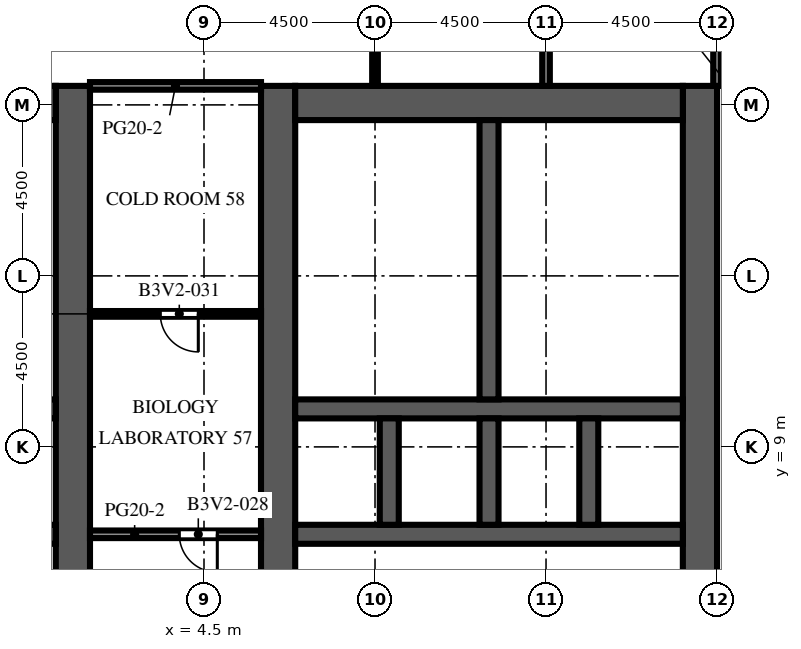
"""IFC4 building model, lengths in metres.
Left out: names, types, materials, properties, quantities, classifications, styles, units other than length and angle.
Written with IfcOpenShell. Run it as: python <this file> out.ifc"""

import sys

from ifc_helpers import new_model, si_unit, direction, frame, frame_2d, origin, place, context, subcontext, project, spatial, rectangle, extrude, element, fill, save


model = new_model("IFC4")
c1 = context("Model", 3, precision=1e-05, world=origin(), true_north=direction((0.0, 1.0)))
c2 = subcontext(c1, "Body", "Model", "MODEL_VIEW")
j1 = project(units=[si_unit("LENGTHUNIT", "METRE"), si_unit("PLANEANGLEUNIT", "RADIAN")], contexts=[c1])
p1 = place(None, origin())
s1 = spatial("IfcSite", under=j1, at=p1, CompositionType="ELEMENT")
p2 = place(p1, origin())
s2 = spatial("IfcBuilding", under=s1, at=p2, CompositionType="ELEMENT")
p3 = place(p2, frame((0.0, 0.0, 106.6)))
s3 = spatial("IfcBuildingStorey", under=s2, at=p3, CompositionType="ELEMENT", Elevation=106.6)
p4 = place(p3, frame((1.05, -9.0, 0.0), z_axis=(0.0, 0.0, 1.0), x_axis=(0.0, 1.0, 0.0)))
e1 = element("IfcWall", 1, at=p4, inside=s3, PredefinedType="SHEAR", context=c2, shape_type="SweptSolid", body=[
    extrude(rectangle(XDim=27.5, YDim=0.9, at=frame_2d((13.75, 0.0))), origin(), (0.0, 0.0, 1.0), 4.1),
])
p5 = place(p4, frame((12.55, 0.0, 0.0)))
e2 = element("IfcOpeningElement", 2, at=p5, cuts=e1, PredefinedType="OPENING", context=c2, shape_type="SweptSolid", body=[
    extrude(rectangle(XDim=2.4, YDim=2.4, at=frame_2d((1.2, 1.2))), frame((0.0, 0.46, 0.0), z_axis=(0.0, -1.0, 0.0), x_axis=(1.0, 0.0, 0.0)), (0.0, 0.0, 1.0), 0.92),
])
p6 = place(p4, frame((3.893, 0.0, 0.0)))
e3 = element("IfcOpeningElement", 3, at=p6, cuts=e1, PredefinedType="OPENING", context=c2, shape_type="SweptSolid", body=[
    extrude(rectangle(XDim=0.923, YDim=2.1, at=frame_2d((0.461, 1.05))), frame((0.0, 0.46, 0.0), z_axis=(0.0, -1.0, 0.0), x_axis=(1.0, 0.0, 0.0)), (0.0, 0.0, 1.0), 0.92),
])
p7 = place(p4, frame((23.427, 0.0, 0.0)))
e4 = element("IfcOpeningElement", 4, at=p7, cuts=e1, PredefinedType="OPENING", context=c2, shape_type="SweptSolid", body=[
    extrude(rectangle(XDim=1.2, YDim=2.1, at=frame_2d((0.6, 1.05))), frame((0.0, 0.46, 0.0), z_axis=(0.0, -1.0, 0.0), x_axis=(1.0, 0.0, 0.0)), (0.0, 0.0, 1.0), 0.92),
])
p8 = place(p3, frame((-9.6, 18.05, 0.0), z_axis=(0.0, 0.0, 1.0), x_axis=(1.0, 0.0, 0.0)))
e5 = element("IfcWall", 5, at=p8, inside=s3, PredefinedType="SHEAR", context=c2, shape_type="SweptSolid", body=[
    extrude(rectangle(XDim=10.2, YDim=0.9, at=frame_2d((5.1, 0.0))), origin(), (0.0, 0.0, 1.0), 4.1),
])
p9 = place(p3, frame((-9.6, 6.7, 0.0), z_axis=(0.0, 0.0, 1.0), x_axis=(1.0, 0.0, 0.0)))
e6 = element("IfcWall", 6, at=p9, inside=s3, PredefinedType="SHEAR", context=c2, shape_type="SweptSolid", body=[
    extrude(rectangle(XDim=10.2, YDim=0.5, at=frame_2d((5.1, 0.0))), origin(), (0.0, 0.0, 1.0), 4.1),
])
p10 = place(p9, frame((0.562, 0.0, 0.0)))
e7 = element("IfcOpeningElement", 7, at=p10, cuts=e6, PredefinedType="OPENING", context=c2, shape_type="SweptSolid", body=[
    extrude(rectangle(XDim=1.1, YDim=2.1, at=frame_2d((0.55, 1.05))), frame((0.0, 0.26, 0.0), z_axis=(0.0, -1.0, 0.0), x_axis=(1.0, 0.0, 0.0)), (0.0, 0.0, 1.0), 0.52),
])
p11 = place(p9, frame((3.288, 0.0, 0.0)))
e8 = element("IfcOpeningElement", 8, at=p11, cuts=e6, PredefinedType="OPENING", context=c2, shape_type="SweptSolid", body=[
    extrude(rectangle(XDim=1.0, YDim=2.1, at=frame_2d((0.5, 1.05))), frame((0.0, 0.26, 0.0), z_axis=(0.0, -1.0, 0.0), x_axis=(1.0, 0.0, 0.0)), (0.0, 0.0, 1.0), 0.52),
])
p12 = place(p9, frame((5.913, 0.0, 0.0)))
e9 = element("IfcOpeningElement", 9, at=p12, cuts=e6, PredefinedType="OPENING", context=c2, shape_type="SweptSolid", body=[
    extrude(rectangle(XDim=1.0, YDim=2.1, at=frame_2d((0.5, 1.05))), frame((0.0, 0.26, 0.0), z_axis=(0.0, -1.0, 0.0), x_axis=(1.0, 0.0, 0.0)), (0.0, 0.0, 1.0), 0.52),
])
p13 = place(p9, frame((8.587, 0.0, 0.0)))
e10 = element("IfcOpeningElement", 10, at=p13, cuts=e6, PredefinedType="OPENING", context=c2, shape_type="SweptSolid", body=[
    extrude(rectangle(XDim=1.0, YDim=2.1, at=frame_2d((0.5, 1.05))), frame((0.0, 0.26, 0.0), z_axis=(0.0, -1.0, 0.0), x_axis=(1.0, 0.0, 0.0)), (0.0, 0.0, 1.0), 0.52),
])
p14 = place(p3, frame((-9.6, 10.0, 0.0), z_axis=(0.0, 0.0, 1.0), x_axis=(1.0, 0.0, 0.0)))
e11 = element("IfcWall", 11, at=p14, inside=s3, PredefinedType="SHEAR", context=c2, shape_type="SweptSolid", body=[
    extrude(rectangle(XDim=10.2, YDim=0.5, at=frame_2d((5.1, 0.0))), origin(), (0.0, 0.0, 1.0), 4.1),
])
p15 = place(p3, frame((6.45, -9.0, 0.0), z_axis=(0.0, 0.0, 1.0), x_axis=(0.0, 1.0, 0.0)))
e12 = element("IfcWall", 12, at=p15, inside=s3, PredefinedType="SHEAR", context=c2, shape_type="SweptSolid", body=[
    extrude(rectangle(XDim=27.5, YDim=0.9, at=frame_2d((13.75, 0.0))), origin(), (0.0, 0.0, 1.0), 4.1),
])
p16 = place(p15, frame((12.55, 0.0, 0.0)))
e13 = element("IfcOpeningElement", 13, at=p16, cuts=e12, PredefinedType="OPENING", context=c2, shape_type="SweptSolid", body=[
    extrude(rectangle(XDim=2.4, YDim=2.4, at=frame_2d((1.2, 1.2))), frame((0.0, 0.46, 0.0), z_axis=(0.0, -1.0, 0.0), x_axis=(1.0, 0.0, 0.0)), (0.0, 0.0, 1.0), 0.92),
])
p17 = place(p15, frame((3.893, 0.0, 0.0)))
e14 = element("IfcOpeningElement", 14, at=p17, cuts=e12, PredefinedType="OPENING", context=c2, shape_type="SweptSolid", body=[
    extrude(rectangle(XDim=0.923, YDim=2.1, at=frame_2d((0.461, 1.05))), frame((0.0, 0.46, 0.0), z_axis=(0.0, -1.0, 0.0), x_axis=(1.0, 0.0, 0.0)), (0.0, 0.0, 1.0), 0.92),
])
p18 = place(p15, frame((23.427, 0.0, 0.0)))
e15 = element("IfcOpeningElement", 15, at=p18, cuts=e12, PredefinedType="OPENING", context=c2, shape_type="SweptSolid", body=[
    extrude(rectangle(XDim=1.2, YDim=2.1, at=frame_2d((0.6, 1.05))), frame((0.0, 0.46, 0.0), z_axis=(0.0, -1.0, 0.0), x_axis=(1.0, 0.0, 0.0)), (0.0, 0.0, 1.0), 0.92),
])
p19 = place(p3, frame((17.55, -9.0, 0.0), z_axis=(0.0, 0.0, 1.0), x_axis=(0.0, 1.0, 0.0)))
e16 = element("IfcWall", 16, at=p19, inside=s3, PredefinedType="SHEAR", context=c2, shape_type="SweptSolid", body=[
    extrude(rectangle(XDim=27.5, YDim=0.9, at=frame_2d((13.75, 0.0))), origin(), (0.0, 0.0, 1.0), 4.1),
])
p20 = place(p19, frame((12.55, 0.0, 0.0)))
e17 = element("IfcOpeningElement", 17, at=p20, cuts=e16, PredefinedType="OPENING", context=c2, shape_type="SweptSolid", body=[
    extrude(rectangle(XDim=2.4, YDim=2.4, at=frame_2d((1.2, 1.2))), frame((0.0, 0.46, 0.0), z_axis=(0.0, -1.0, 0.0), x_axis=(1.0, 0.0, 0.0)), (0.0, 0.0, 1.0), 0.92),
])
p21 = place(p19, frame((6.825, 0.0, 0.0)))
e18 = element("IfcOpeningElement", 18, at=p21, cuts=e16, PredefinedType="OPENING", context=c2, shape_type="SweptSolid", body=[
    extrude(rectangle(XDim=1.2, YDim=2.1, at=frame_2d((0.6, 1.05))), frame((0.0, 0.46, 0.0), z_axis=(0.0, -1.0, 0.0), x_axis=(1.0, 0.0, 0.0)), (0.0, 0.0, 1.0), 0.92),
])
p22 = place(p19, frame((19.475, 0.0, 0.0)))
e19 = element("IfcOpeningElement", 19, at=p22, cuts=e16, PredefinedType="OPENING", context=c2, shape_type="SweptSolid", body=[
    extrude(rectangle(XDim=1.2, YDim=2.1, at=frame_2d((0.6, 1.05))), frame((0.0, 0.46, 0.0), z_axis=(0.0, -1.0, 0.0), x_axis=(1.0, 0.0, 0.0)), (0.0, 0.0, 1.0), 0.92),
])
p23 = place(p3, frame((6.9, 18.05, 0.0), z_axis=(0.0, 0.0, 1.0), x_axis=(1.0, 0.0, 0.0)))
e20 = element("IfcWall", 20, at=p23, inside=s3, PredefinedType="SHEAR", context=c2, shape_type="SweptSolid", body=[
    extrude(rectangle(XDim=10.2, YDim=0.9, at=frame_2d((5.1, 0.0))), origin(), (0.0, 0.0, 1.0), 4.1),
])
p24 = place(p3, frame((6.9, 6.7, 0.0), z_axis=(0.0, 0.0, 1.0), x_axis=(1.0, 0.0, 0.0)))
e21 = element("IfcWall", 21, at=p24, inside=s3, PredefinedType="SHEAR", context=c2, shape_type="SweptSolid", body=[
    extrude(rectangle(XDim=10.2, YDim=0.5, at=frame_2d((5.1, 0.0))), origin(), (0.0, 0.0, 1.0), 4.1),
])
p25 = place(p24, frame((0.562, 0.0, 0.0)))
e22 = element("IfcOpeningElement", 22, at=p25, cuts=e21, PredefinedType="OPENING", context=c2, shape_type="SweptSolid", body=[
    extrude(rectangle(XDim=1.1, YDim=2.1, at=frame_2d((0.55, 1.05))), frame((0.0, 0.26, 0.0), z_axis=(0.0, -1.0, 0.0), x_axis=(1.0, 0.0, 0.0)), (0.0, 0.0, 1.0), 0.52),
])
p26 = place(p24, frame((3.288, 0.0, 0.0)))
e23 = element("IfcOpeningElement", 23, at=p26, cuts=e21, PredefinedType="OPENING", context=c2, shape_type="SweptSolid", body=[
    extrude(rectangle(XDim=1.0, YDim=2.1, at=frame_2d((0.5, 1.05))), frame((0.0, 0.26, 0.0), z_axis=(0.0, -1.0, 0.0), x_axis=(1.0, 0.0, 0.0)), (0.0, 0.0, 1.0), 0.52),
])
p27 = place(p24, frame((5.913, 0.0, 0.0)))
e24 = element("IfcOpeningElement", 24, at=p27, cuts=e21, PredefinedType="OPENING", context=c2, shape_type="SweptSolid", body=[
    extrude(rectangle(XDim=1.0, YDim=2.1, at=frame_2d((0.5, 1.05))), frame((0.0, 0.26, 0.0), z_axis=(0.0, -1.0, 0.0), x_axis=(1.0, 0.0, 0.0)), (0.0, 0.0, 1.0), 0.52),
])
p28 = place(p24, frame((8.587, 0.0, 0.0)))
e25 = element("IfcOpeningElement", 25, at=p28, cuts=e21, PredefinedType="OPENING", context=c2, shape_type="SweptSolid", body=[
    extrude(rectangle(XDim=1.0, YDim=2.1, at=frame_2d((0.5, 1.05))), frame((0.0, 0.26, 0.0), z_axis=(0.0, -1.0, 0.0), x_axis=(1.0, 0.0, 0.0)), (0.0, 0.0, 1.0), 0.52),
])
p29 = place(p3, frame((6.9, 10.0, 0.0), z_axis=(0.0, 0.0, 1.0), x_axis=(1.0, 0.0, 0.0)))
e26 = element("IfcWall", 26, at=p29, inside=s3, PredefinedType="SHEAR", context=c2, shape_type="SweptSolid", body=[
    extrude(rectangle(XDim=10.2, YDim=0.5, at=frame_2d((5.1, 0.0))), origin(), (0.0, 0.0, 1.0), 4.1),
])
for number, where, z_axis, x_axis in (
    (27, (9.375, 6.95, 0.0), (0.0, 0.0, 1.0), (0.0, 1.0, 0.0)),
    (28, (12.0, 6.95, 0.0), (0.0, 0.0, 1.0), (0.0, 1.0, 0.0)),
    (29, (14.625, 6.95, 0.0), (0.0, 0.0, 1.0), (0.0, 1.0, 0.0)),
):
    element("IfcWall", number, at=place(p3, frame(where, z_axis=z_axis, x_axis=x_axis)), inside=s3, PredefinedType="SHEAR", context=c2, shape_type="SweptSolid", body=[
        extrude(rectangle(XDim=2.8, YDim=0.5, at=frame_2d((1.4, 0.0))), origin(), (0.0, 0.0, 1.0), 4.1),
    ])
p30 = place(p3, frame((12.0, 10.25, 0.0), z_axis=(0.0, 0.0, 1.0), x_axis=(0.0, 1.0, 0.0)))
e30 = element("IfcWall", 30, at=p30, inside=s3, PredefinedType="SHEAR", context=c2, shape_type="SweptSolid", body=[
    extrude(rectangle(XDim=7.35, YDim=0.5, at=frame_2d((3.675, 0.0))), origin(), (0.0, 0.0, 1.0), 4.1),
])
p31 = place(p3, frame((-0.7, 12.455, 0.0), z_axis=(0.0, 0.0, 1.0), x_axis=(1.0, 0.0, 0.0)))
e31 = element("IfcWall", 31, at=p31, inside=s3, PredefinedType="PARTITIONING", context=c2, shape_type="SweptSolid", body=[
    extrude(rectangle(XDim=1.3, YDim=0.1, at=frame_2d((0.65, 0.0))), origin(), (0.0, 0.0, 1.0), 3.5),
])
p32 = place(p31, frame((0.2, 0.0, 0.0)))
e32 = element("IfcOpeningElement", 32, at=p32, cuts=e31, PredefinedType="OPENING", context=c2, shape_type="SweptSolid", body=[
    extrude(rectangle(XDim=0.9, YDim=2.1, at=frame_2d((0.45, 1.05))), frame((0.0, 0.06, 0.0), z_axis=(0.0, -1.0, 0.0), x_axis=(1.0, 0.0, 0.0)), (0.0, 0.0, 1.0), 0.12),
])
p33 = place(p3, frame((6.9, 12.455, 0.0), z_axis=(0.0, 0.0, 1.0), x_axis=(1.0, 0.0, 0.0)))
e33 = element("IfcWall", 33, at=p33, inside=s3, PredefinedType="PARTITIONING", context=c2, shape_type="SweptSolid", body=[
    extrude(rectangle(XDim=1.3, YDim=0.1, at=frame_2d((0.65, 0.0))), origin(), (0.0, 0.0, 1.0), 3.5),
])
p34 = place(p33, frame((0.2, 0.0, 0.0)))
e34 = element("IfcOpeningElement", 34, at=p34, cuts=e33, PredefinedType="OPENING", context=c2, shape_type="SweptSolid", body=[
    extrude(rectangle(XDim=0.9, YDim=2.1, at=frame_2d((0.45, 1.05))), frame((0.0, 0.06, 0.0), z_axis=(0.0, -1.0, 0.0), x_axis=(1.0, 0.0, 0.0)), (0.0, 0.0, 1.0), 0.12),
])
p35 = place(p3, frame((8.2, 12.455, 0.0), z_axis=(0.0, 0.0, 1.0), x_axis=(1.0, 0.0, 0.0)))
e35 = element("IfcWall", 35, at=p35, inside=s3, PredefinedType="PARTITIONING", context=c2, shape_type="SweptSolid", body=[
    extrude(rectangle(XDim=3.55, YDim=0.1, at=frame_2d((1.775, 0.0))), origin(), (0.0, 0.0, 1.0), 3.5),
])
p36 = place(p3, frame((8.2, 12.455, 0.0), z_axis=(0.0, 0.0, 1.0), x_axis=(0.0, 1.0, 0.0)))
e36 = element("IfcWall", 36, at=p36, inside=s3, PredefinedType="PARTITIONING", context=c2, shape_type="SweptSolid", body=[
    extrude(rectangle(XDim=2.573, YDim=0.1, at=frame_2d((1.286, 0.0))), origin(), (0.0, 0.0, 1.0), 3.5),
])
p37 = place(p36, frame((0.786, 0.0, 0.0)))
e37 = element("IfcOpeningElement", 37, at=p37, cuts=e36, PredefinedType="OPENING", context=c2, shape_type="SweptSolid", body=[
    extrude(rectangle(XDim=1.0, YDim=2.1, at=frame_2d((0.5, 1.05))), frame((0.0, 0.06, 0.0), z_axis=(0.0, -1.0, 0.0), x_axis=(1.0, 0.0, 0.0)), (0.0, 0.0, 1.0), 0.12),
])
p38 = place(p3, frame((8.2, 15.028, 0.0), z_axis=(0.0, 0.0, 1.0), x_axis=(0.0, 1.0, 0.0)))
e38 = element("IfcWall", 38, at=p38, inside=s3, PredefinedType="PARTITIONING", context=c2, shape_type="SweptSolid", body=[
    extrude(rectangle(XDim=2.573, YDim=0.1, at=frame_2d((1.286, 0.0))), origin(), (0.0, 0.0, 1.0), 3.5),
])
p39 = place(p38, frame((0.786, 0.0, 0.0)))
e39 = element("IfcOpeningElement", 39, at=p39, cuts=e38, PredefinedType="OPENING", context=c2, shape_type="SweptSolid", body=[
    extrude(rectangle(XDim=1.0, YDim=2.1, at=frame_2d((0.5, 1.05))), frame((0.0, 0.06, 0.0), z_axis=(0.0, -1.0, 0.0), x_axis=(1.0, 0.0, 0.0)), (0.0, 0.0, 1.0), 0.12),
])
p40 = place(p3, frame((8.2, 15.028, 0.0), z_axis=(0.0, 0.0, 1.0), x_axis=(1.0, 0.0, 0.0)))
e40 = element("IfcWall", 40, at=p40, inside=s3, PredefinedType="PARTITIONING", context=c2, shape_type="SweptSolid", body=[
    extrude(rectangle(XDim=3.55, YDim=0.1, at=frame_2d((1.775, 0.0))), origin(), (0.0, 0.0, 1.0), 3.5),
])
p41 = place(p3, frame((9.0, 18.5, 0.0), z_axis=(0.0, 0.0, 1.0), x_axis=(0.0, 1.0, 0.0)))
e41 = element("IfcWall", 41, at=p41, inside=s3, PredefinedType="PARTITIONING", context=c2, shape_type="SweptSolid", body=[
    extrude(rectangle(XDim=3.3, YDim=0.15, at=frame_2d((1.65, 0.0))), origin(), (0.0, 0.0, 1.0), 3.5),
])
p42 = place(p3, frame((13.5, 18.5, 0.0), z_axis=(0.0, 0.0, 1.0), x_axis=(0.0, 1.0, 0.0)))
e42 = element("IfcWall", 42, at=p42, inside=s3, PredefinedType="PARTITIONING", context=c2, shape_type="SweptSolid", body=[
    extrude(rectangle(XDim=12.4, YDim=0.2, at=frame_2d((6.2, 0.0))), origin(), (0.0, 0.0, 1.0), 3.5),
])
p43 = place(p3, frame((18.0, 18.5, 0.0), z_axis=(0.0, 0.0, 1.0), x_axis=(0.0, 1.0, 0.0)))
e43 = element("IfcWall", 43, at=p43, inside=s3, PredefinedType="PARTITIONING", context=c2, shape_type="SweptSolid", body=[
    extrude(rectangle(XDim=3.3, YDim=0.2, at=frame_2d((1.65, 0.0))), origin(), (0.0, 0.0, 1.0), 3.5),
])
p44 = place(p3, frame((1.5, 6.7, 0.0), z_axis=(0.0, 0.0, 1.0), x_axis=(1.0, 0.0, 0.0)))
e44 = element("IfcWall", 44, at=p44, inside=s3, PredefinedType="PARTITIONING", context=c2, shape_type="SweptSolid", body=[
    extrude(rectangle(XDim=4.5, YDim=0.2, at=frame_2d((2.25, 0.0))), origin(), (0.0, 0.0, 1.0), 3.5),
])
p45 = place(p44, frame((2.35, 0.0, 0.0)))
e45 = element("IfcOpeningElement", 45, at=p45, cuts=e44, PredefinedType="OPENING", context=c2, shape_type="SweptSolid", body=[
    extrude(rectangle(XDim=1.0, YDim=2.1, at=frame_2d((0.5, 1.05))), frame((0.0, 0.11, 0.0), z_axis=(0.0, -1.0, 0.0), x_axis=(1.0, 0.0, 0.0)), (0.0, 0.0, 1.0), 0.22),
])
p46 = place(p3, frame((1.5, 12.5, 0.0), z_axis=(0.0, 0.0, 1.0), x_axis=(1.0, 0.0, 0.0)))
e46 = element("IfcWall", 46, at=p46, inside=s3, PredefinedType="PARTITIONING", context=c2, shape_type="SweptSolid", body=[
    extrude(rectangle(XDim=4.5, YDim=0.15, at=frame_2d((2.25, 0.0))), origin(), (0.0, 0.0, 1.0), 3.5),
])
p47 = place(p46, frame((1.85, 0.0, 0.0)))
e47 = element("IfcOpeningElement", 47, at=p47, cuts=e46, PredefinedType="OPENING", context=c2, shape_type="SweptSolid", body=[
    extrude(rectangle(XDim=1.0, YDim=2.1, at=frame_2d((0.5, 1.05))), frame((0.0, 0.085, 0.0), z_axis=(0.0, -1.0, 0.0), x_axis=(1.0, 0.0, 0.0)), (0.0, 0.0, 1.0), 0.17),
])
p48 = place(p3, frame((1.5, 18.5, 0.0), z_axis=(0.0, 0.0, 1.0), x_axis=(1.0, 0.0, 0.0)))
e48 = element("IfcWall", 48, at=p48, inside=s3, PredefinedType="PARTITIONING", context=c2, shape_type="SweptSolid", body=[
    extrude(rectangle(XDim=4.5, YDim=0.2, at=frame_2d((2.25, 0.0))), origin(), (0.0, 0.0, 1.0), 3.5),
])
p49 = place(p25, origin())
e49 = element("IfcDoor", 49, at=p49, inside=s3, OperationType="DOUBLE_DOOR_SLIDING", PredefinedType="DOOR", context=c2, shape_type="SweptSolid", body=[
    extrude(rectangle(XDim=1.1, YDim=2.1, at=frame_2d((0.55, 1.05))), frame((0.0, 0.025, 0.0), z_axis=(0.0, -1.0, 0.0), x_axis=(1.0, 0.0, 0.0)), (0.0, 0.0, 1.0), 0.05),
])
fill(e22, e49)
p50 = place(p5, origin())
e50 = element("IfcDoor", 50, at=p50, inside=s3, OperationType="DOUBLE_DOOR_DOUBLE_SWING", PredefinedType="DOOR", context=c2, shape_type="SweptSolid", body=[
    extrude(rectangle(XDim=2.4, YDim=2.4, at=frame_2d((1.2, 1.2))), frame((0.0, 0.025, 0.0), z_axis=(0.0, -1.0, 0.0), x_axis=(1.0, 0.0, 0.0)), (0.0, 0.0, 1.0), 0.05),
])
fill(e2, e50)
p51 = place(p16, origin())
e51 = element("IfcDoor", 51, at=p51, inside=s3, OperationType="DOUBLE_DOOR_DOUBLE_SWING", PredefinedType="DOOR", context=c2, shape_type="SweptSolid", body=[
    extrude(rectangle(XDim=2.4, YDim=2.4, at=frame_2d((1.2, 1.2))), frame((0.0, 0.025, 0.0), z_axis=(0.0, -1.0, 0.0), x_axis=(1.0, 0.0, 0.0)), (0.0, 0.0, 1.0), 0.05),
])
fill(e13, e51)
p52 = place(p20, origin())
e52 = element("IfcDoor", 52, at=p52, inside=s3, OperationType="DOUBLE_DOOR_DOUBLE_SWING", PredefinedType="DOOR", context=c2, shape_type="SweptSolid", body=[
    extrude(rectangle(XDim=2.4, YDim=2.4, at=frame_2d((1.2, 1.2))), frame((0.0, 0.025, 0.0), z_axis=(0.0, -1.0, 0.0), x_axis=(1.0, 0.0, 0.0)), (0.0, 0.0, 1.0), 0.05),
])
fill(e17, e52)
p53 = place(p22, frame((1.2, 0.0, 0.0), z_axis=(0.0, 0.0, 1.0), x_axis=(-1.0, 0.0, 0.0)))
e53 = element("IfcDoor", 53, at=p53, inside=s3, OperationType="SINGLE_SWING_LEFT", PredefinedType="DOOR", context=c2, shape_type="SweptSolid", body=[
    extrude(rectangle(XDim=1.2, YDim=2.1, at=frame_2d((0.6, 1.05))), frame((0.0, 0.025, 0.0), z_axis=(0.0, -1.0, 0.0), x_axis=(1.0, 0.0, 0.0)), (0.0, 0.0, 1.0), 0.05),
])
fill(e19, e53)
p54 = place(p7, origin())
e54 = element("IfcDoor", 54, at=p54, inside=s3, OperationType="SINGLE_SWING_RIGHT", PredefinedType="DOOR", context=c2, shape_type="SweptSolid", body=[
    extrude(rectangle(XDim=1.2, YDim=2.1, at=frame_2d((0.6, 1.05))), frame((0.0, 0.425, 0.0), z_axis=(0.0, -1.0, 0.0), x_axis=(1.0, 0.0, 0.0)), (0.0, 0.0, 1.0), 0.05),
])
fill(e4, e54)
p55 = place(p26, origin())
e55 = element("IfcDoor", 55, at=p55, inside=s3, OperationType="SINGLE_SWING_RIGHT", PredefinedType="DOOR", context=c2, shape_type="SweptSolid", body=[
    extrude(rectangle(XDim=1.0, YDim=2.1, at=frame_2d((0.5, 1.05))), frame((0.0, 0.025, 0.0), z_axis=(0.0, -1.0, 0.0), x_axis=(1.0, 0.0, 0.0)), (0.0, 0.0, 1.0), 0.05),
])
fill(e23, e55)
p56 = place(p27, origin())
e56 = element("IfcDoor", 56, at=p56, inside=s3, OperationType="SINGLE_SWING_LEFT", PredefinedType="DOOR", context=c2, shape_type="SweptSolid", body=[
    extrude(rectangle(XDim=1.0, YDim=2.1, at=frame_2d((0.5, 1.05))), frame((0.0, 0.025, 0.0), z_axis=(0.0, -1.0, 0.0), x_axis=(1.0, 0.0, 0.0)), (0.0, 0.0, 1.0), 0.05),
])
fill(e24, e56)
p57 = place(p28, origin())
e57 = element("IfcDoor", 57, at=p57, inside=s3, OperationType="SINGLE_SWING_RIGHT", PredefinedType="DOOR", context=c2, shape_type="SweptSolid", body=[
    extrude(rectangle(XDim=1.0, YDim=2.1, at=frame_2d((0.5, 1.05))), frame((0.0, 0.025, 0.0), z_axis=(0.0, -1.0, 0.0), x_axis=(1.0, 0.0, 0.0)), (0.0, 0.0, 1.0), 0.05),
])
fill(e25, e57)
p58 = place(p34, origin())
e58 = element("IfcDoor", 58, at=p58, inside=s3, OperationType="SINGLE_SWING_RIGHT", PredefinedType="DOOR", context=c2, shape_type="SweptSolid", body=[
    extrude(rectangle(XDim=0.9, YDim=2.1, at=frame_2d((0.45, 1.05))), frame((0.0, 0.025, 0.0), z_axis=(0.0, -1.0, 0.0), x_axis=(1.0, 0.0, 0.0)), (0.0, 0.0, 1.0), 0.05),
])
fill(e34, e58)
p59 = place(p18, origin())
e59 = element("IfcDoor", 59, at=p59, inside=s3, OperationType="SINGLE_SWING_LEFT", PredefinedType="DOOR", context=c2, shape_type="SweptSolid", body=[
    extrude(rectangle(XDim=1.2, YDim=2.1, at=frame_2d((0.6, 1.05))), frame((0.0, -0.375, 0.0), z_axis=(0.0, -1.0, 0.0), x_axis=(1.0, 0.0, 0.0)), (0.0, 0.0, 1.0), 0.05),
])
fill(e15, e59)
p60 = place(p37, origin())
e60 = element("IfcDoor", 60, at=p60, inside=s3, OperationType="SINGLE_SWING_RIGHT", PredefinedType="DOOR", context=c2, shape_type="SweptSolid", body=[
    extrude(rectangle(XDim=1.0, YDim=2.1, at=frame_2d((0.5, 1.05))), frame((0.0, 0.025, 0.0), z_axis=(0.0, -1.0, 0.0), x_axis=(1.0, 0.0, 0.0)), (0.0, 0.0, 1.0), 0.05),
])
fill(e37, e60)
p61 = place(p39, origin())
e61 = element("IfcDoor", 61, at=p61, inside=s3, OperationType="SINGLE_SWING_LEFT", PredefinedType="DOOR", context=c2, shape_type="SweptSolid", body=[
    extrude(rectangle(XDim=1.0, YDim=2.1, at=frame_2d((0.5, 1.05))), frame((0.0, 0.025, 0.0), z_axis=(0.0, -1.0, 0.0), x_axis=(1.0, 0.0, 0.0)), (0.0, 0.0, 1.0), 0.05),
])
fill(e39, e61)
p62 = place(p45, origin())
e62 = element("IfcDoor", 62, at=p62, inside=s3, OperationType="SINGLE_SWING_RIGHT", PredefinedType="DOOR", context=c2, shape_type="SweptSolid", body=[
    extrude(rectangle(XDim=1.0, YDim=2.1, at=frame_2d((0.5, 1.05))), frame((0.0, 0.025, 0.0), z_axis=(0.0, -1.0, 0.0), x_axis=(1.0, 0.0, 0.0)), (0.0, 0.0, 1.0), 0.05),
])
fill(e45, e62)
p63 = place(p47, origin())
e63 = element("IfcDoor", 63, at=p63, inside=s3, OperationType="SINGLE_SWING_RIGHT", PredefinedType="DOOR", context=c2, shape_type="SweptSolid", body=[
    extrude(rectangle(XDim=1.0, YDim=2.1, at=frame_2d((0.5, 1.05))), frame((0.0, 0.025, 0.0), z_axis=(0.0, -1.0, 0.0), x_axis=(1.0, 0.0, 0.0)), (0.0, 0.0, 1.0), 0.05),
])
fill(e47, e63)
save(model, sys.argv[1])
